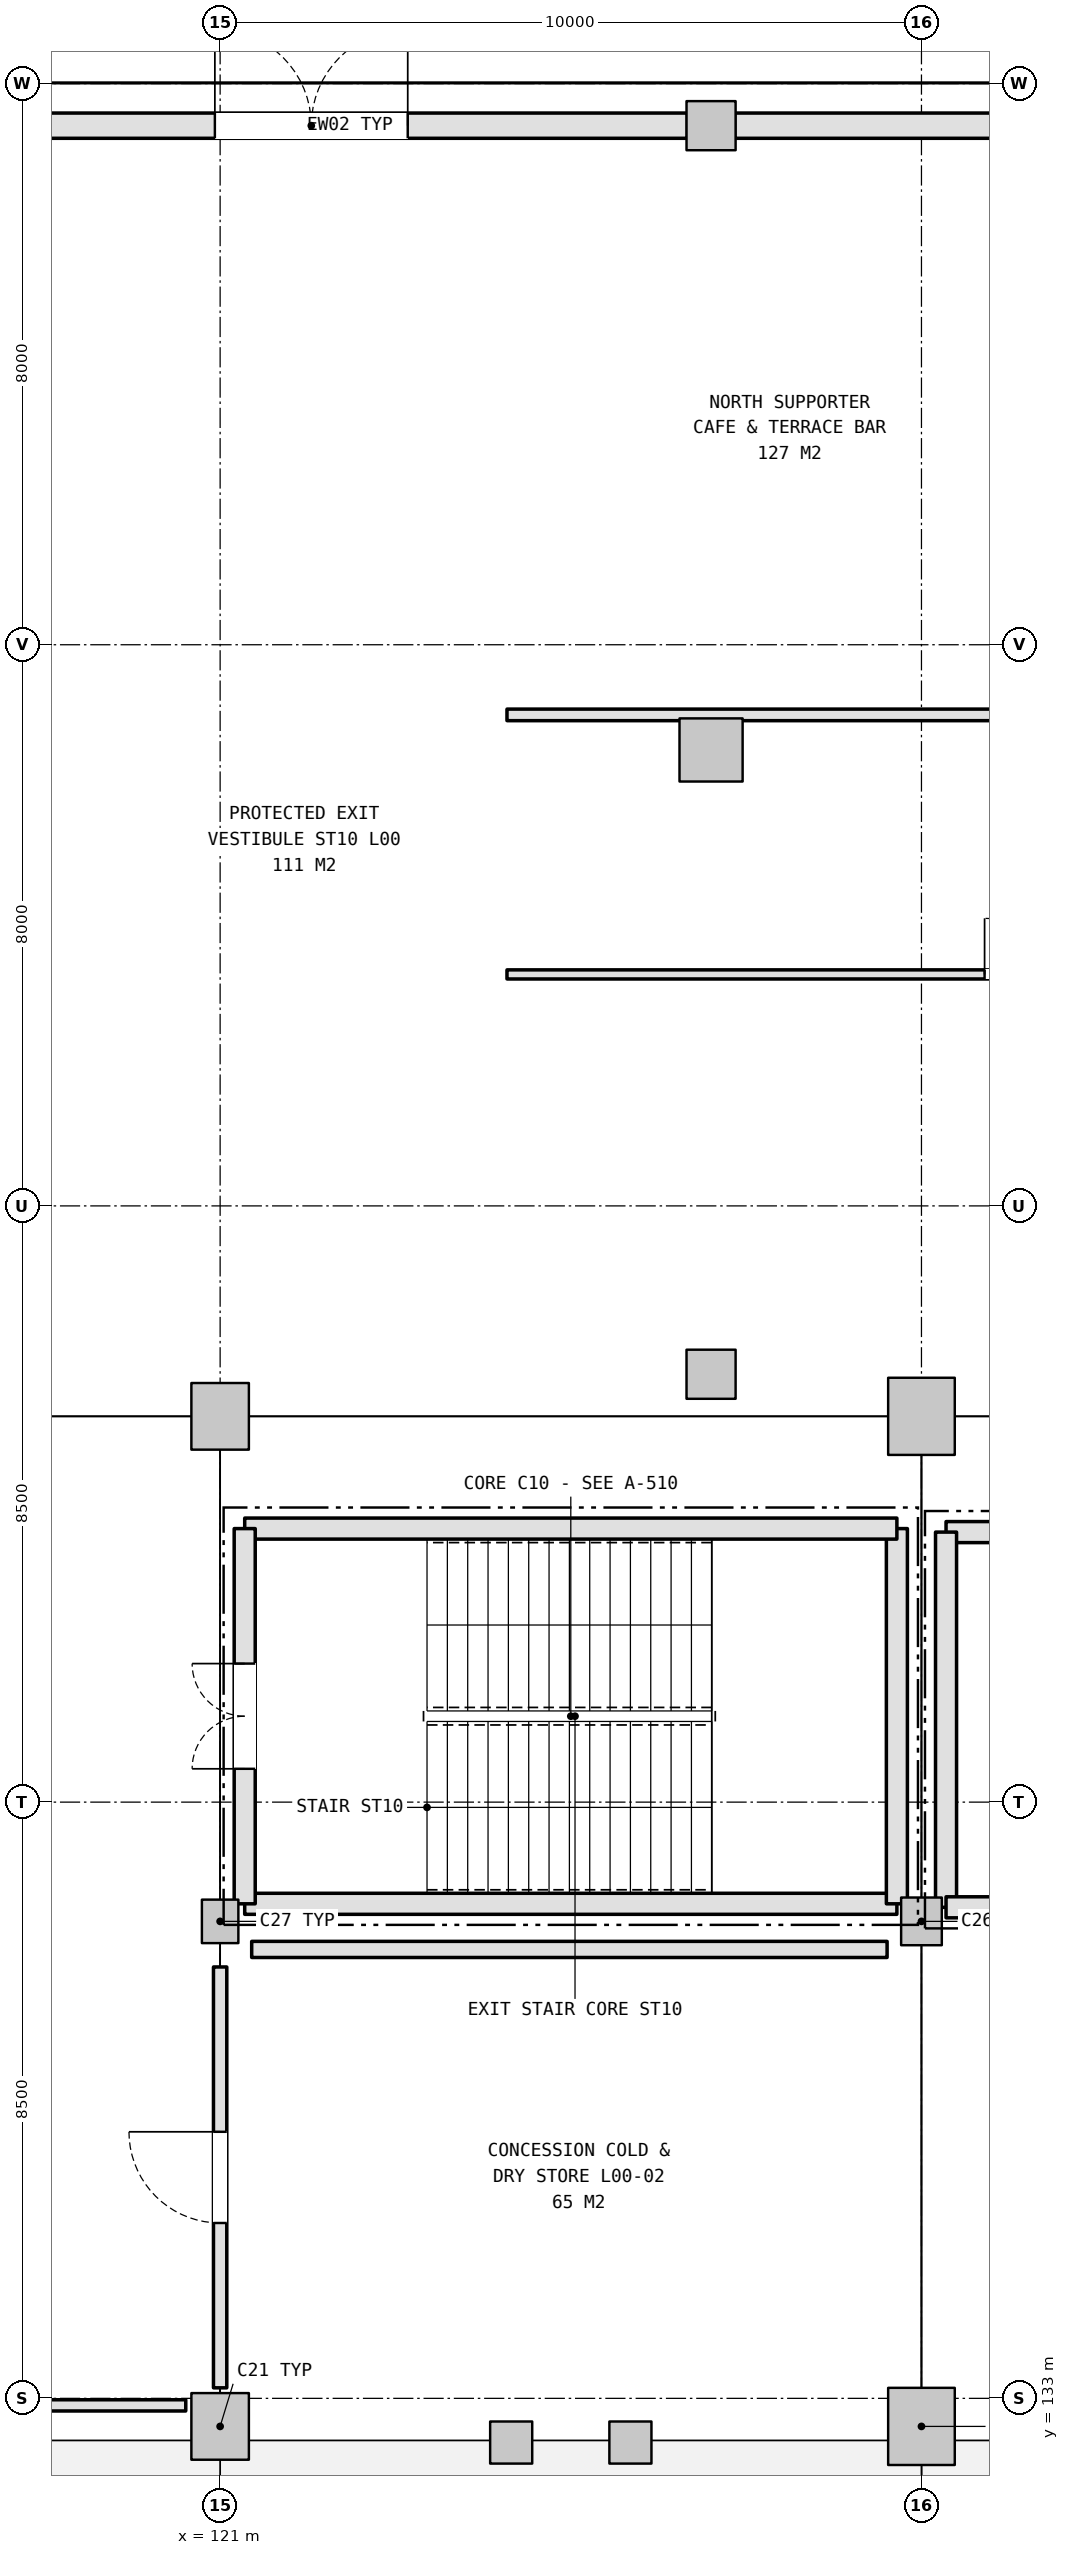
"""IFC4 building model, lengths in metres.
Left out: names, types, materials, properties, quantities, classifications, styles, units other than length and angle.
Written with IfcOpenShell. Run it as: python <this file> out.ifc"""

import sys

from ifc_helpers import new_model, si_unit, direction, frame, frame_2d, origin, origin_2d, place, context, subcontext, project, spatial, rectangle, extrude, element, fill, save


model = new_model("IFC4")
c1 = context("Model", 3, precision=1e-05, world=origin(), true_north=direction((0.0, 1.0)))
c2 = subcontext(c1, "Body", "Model", "MODEL_VIEW")
j1 = project(units=[si_unit("LENGTHUNIT", "METRE"), si_unit("PLANEANGLEUNIT", "RADIAN")], contexts=[c1])
p1 = place(None, origin())
s1 = spatial("IfcSite", under=j1, at=p1, CompositionType="ELEMENT")
p2 = place(p1, origin())
s2 = spatial("IfcBuilding", under=s1, at=p2, CompositionType="ELEMENT")
p3 = place(p2, origin())
s3 = spatial("IfcBuildingStorey", under=s2, at=p3, CompositionType="ELEMENT", Elevation=0.0)
p4 = place(p3, frame((131.0, 132.6, 0.0), z_axis=(0.0, 0.0, 1.0), x_axis=(1.0, 0.0, 0.0)))
e1 = element("IfcColumn", 1, at=p4, inside=s3, PredefinedType="COLUMN", context=c2, shape_type="SweptSolid", body=[
    extrude(rectangle(XDim=0.95, YDim=1.1, at=origin_2d()), origin(), (0.0, 0.0, 1.0), 5.4),
])
p5 = place(p3, frame((131.0, 139.8, 0.0), z_axis=(0.0, 0.0, 1.0), x_axis=(1.0, 0.0, 0.0)))
e2 = element("IfcColumn", 2, at=p5, inside=s3, PredefinedType="COLUMN", context=c2, shape_type="SweptSolid", body=[
    extrude(rectangle(XDim=0.58, YDim=0.68, at=origin_2d()), origin(), (0.0, 0.0, 1.0), 5.4),
])
p6 = place(p3, frame((131.0, 147.0, 0.0), z_axis=(0.0, 0.0, 1.0), x_axis=(1.0, 0.0, 0.0)))
e3 = element("IfcColumn", 3, at=p6, inside=s3, PredefinedType="COLUMN", context=c2, shape_type="SweptSolid", body=[
    extrude(rectangle(XDim=0.95, YDim=1.1, at=origin_2d()), origin(), (0.0, 0.0, 1.0), 5.4),
])
p7 = place(p3, frame((121.0, 132.6, 0.0), z_axis=(0.0, 0.0, 1.0), x_axis=(1.0, 0.0, 0.0)))
e4 = element("IfcColumn", 4, at=p7, inside=s3, PredefinedType="COLUMN", context=c2, shape_type="SweptSolid", body=[
    extrude(rectangle(XDim=0.82, YDim=0.95, at=origin_2d()), origin(), (0.0, 0.0, 1.0), 5.4),
])
p8 = place(p3, frame((121.0, 139.8, 0.0), z_axis=(0.0, 0.0, 1.0), x_axis=(1.0, 0.0, 0.0)))
e5 = element("IfcColumn", 5, at=p8, inside=s3, PredefinedType="COLUMN", context=c2, shape_type="SweptSolid", body=[
    extrude(rectangle(XDim=0.52, YDim=0.62, at=origin_2d()), origin(), (0.0, 0.0, 1.0), 5.4),
])
p9 = place(p3, frame((121.0, 147.0, 0.0), z_axis=(0.0, 0.0, 1.0), x_axis=(1.0, 0.0, 0.0)))
e6 = element("IfcColumn", 6, at=p9, inside=s3, PredefinedType="COLUMN", context=c2, shape_type="SweptSolid", body=[
    extrude(rectangle(XDim=0.82, YDim=0.95, at=origin_2d()), origin(), (0.0, 0.0, 1.0), 5.4),
])
p10 = place(p3, frame((128.0, 147.6, 0.0), z_axis=(0.0, 0.0, 1.0), x_axis=(1.0, 0.0, 0.0)))
e7 = element("IfcColumn", 7, at=p10, inside=s3, PredefinedType="COLUMN", context=c2, shape_type="SweptSolid", body=[
    extrude(rectangle(XDim=0.7, YDim=0.7, at=origin_2d()), origin(), (0.0, 0.0, 1.0), 5.4),
])
p11 = place(p3, frame((128.0, 156.5, 0.0), z_axis=(0.0, 0.0, 1.0), x_axis=(1.0, 0.0, 0.0)))
e8 = element("IfcColumn", 8, at=p11, inside=s3, PredefinedType="COLUMN", context=c2, shape_type="SweptSolid", body=[
    extrude(rectangle(XDim=0.9, YDim=0.9, at=origin_2d()), origin(), (0.0, 0.0, 1.0), 5.4),
])
p12 = place(p3, frame((128.0, 165.4, 0.0), z_axis=(0.0, 0.0, 1.0), x_axis=(1.0, 0.0, 0.0)))
e9 = element("IfcColumn", 9, at=p12, inside=s3, PredefinedType="COLUMN", context=c2, shape_type="SweptSolid", body=[
    extrude(rectangle(XDim=0.7, YDim=0.7, at=origin_2d()), origin(), (0.0, 0.0, 1.0), 5.4),
])
p13 = place(p3, frame((116.938, 165.4, 0.0), z_axis=(0.0, 0.0, 1.0), x_axis=(1.0, 0.0, 0.0)))
e10 = element("IfcWall", 10, at=p13, inside=s3, PredefinedType="SOLIDWALL", context=c2, shape_type="SweptSolid", body=[
    extrude(rectangle(XDim=10.724, YDim=0.36, at=frame_2d((5.362, 0.0))), origin(), (0.0, 0.0, 1.0), 4.475),
])
p14 = place(p13, frame((3.987, 0.0, 0.0)))
e11 = element("IfcOpeningElement", 11, at=p14, cuts=e10, PredefinedType="OPENING", context=c2, shape_type="SweptSolid", body=[
    extrude(rectangle(XDim=2.75, YDim=2.4, at=frame_2d((1.375, 1.2))), frame((0.0, 0.19, 0.0), z_axis=(0.0, -1.0, 0.0), x_axis=(1.0, 0.0, 0.0)), (0.0, 0.0, 1.0), 0.38),
])
p15 = place(p3, frame((128.338, 165.4, 0.0), z_axis=(0.0, 0.0, 1.0), x_axis=(1.0, 0.0, 0.0)))
e12 = element("IfcWall", 12, at=p15, inside=s3, PredefinedType="SOLIDWALL", context=c2, shape_type="SweptSolid", body=[
    extrude(rectangle(XDim=10.724, YDim=0.36, at=frame_2d((5.362, 0.0))), origin(), (0.0, 0.0, 1.0), 4.475),
])
p16 = place(p15, frame((3.987, 0.0, 0.0)))
e13 = element("IfcOpeningElement", 13, at=p16, cuts=e12, PredefinedType="OPENING", context=c2, shape_type="SweptSolid", body=[
    extrude(rectangle(XDim=2.75, YDim=2.4, at=frame_2d((1.375, 1.2))), frame((0.0, 0.19, 0.0), z_axis=(0.0, -1.0, 0.0), x_axis=(1.0, 0.0, 0.0)), (0.0, 0.0, 1.0), 0.38),
])
p17 = place(p3, frame((140.65, 145.35, 0.0), z_axis=(0.0, 0.0, 1.0), x_axis=(-1.0, 0.0, 0.0)))
e14 = element("IfcWall", 14, at=p17, inside=s3, PredefinedType="SHEAR", context=c2, shape_type="SweptSolid", body=[
    extrude(rectangle(XDim=9.299, YDim=0.3, at=frame_2d((4.65, 0.0))), origin(), (0.0, 0.0, 1.0), 5.14),
])
p18 = place(p3, frame((131.35, 145.35, 0.0), z_axis=(0.0, 0.0, 1.0), x_axis=(0.0, -1.0, 0.0)))
e15 = element("IfcWall", 15, at=p18, inside=s3, PredefinedType="SHEAR", context=c2, shape_type="SweptSolid", body=[
    extrude(rectangle(XDim=5.349, YDim=0.3, at=frame_2d((2.675, 0.0))), origin(), (0.0, 0.0, 1.0), 5.14),
])
for number, where, z_axis, x_axis in (
    (16, (131.35, 140.0, 0.0), (0.0, 0.0, 1.0), (1.0, 0.0, 0.0)),
    (17, (121.35, 140.05, 0.0), (0.0, 0.0, 1.0), (1.0, 0.0, 0.0)),
):
    element("IfcWall", number, at=place(p3, frame(where, z_axis=z_axis, x_axis=x_axis)), inside=s3, PredefinedType="SHEAR", context=c2, shape_type="SweptSolid", body=[
        extrude(rectangle(XDim=9.299, YDim=0.3, at=frame_2d((4.65, 0.0))), origin(), (0.0, 0.0, 1.0), 5.14),
    ])
p19 = place(p3, frame((130.65, 140.05, 0.0), z_axis=(0.0, 0.0, 1.0), x_axis=(0.0, 1.0, 0.0)))
e18 = element("IfcWall", 18, at=p19, inside=s3, PredefinedType="SHEAR", context=c2, shape_type="SweptSolid", body=[
    extrude(rectangle(XDim=5.349, YDim=0.3, at=frame_2d((2.675, 0.0))), origin(), (0.0, 0.0, 1.0), 5.14),
])
p20 = place(p3, frame((130.65, 145.4, 0.0), z_axis=(0.0, 0.0, 1.0), x_axis=(-1.0, 0.0, 0.0)))
e19 = element("IfcWall", 19, at=p20, inside=s3, PredefinedType="SHEAR", context=c2, shape_type="SweptSolid", body=[
    extrude(rectangle(XDim=9.299, YDim=0.3, at=frame_2d((4.65, 0.0))), origin(), (0.0, 0.0, 1.0), 5.14),
])
p21 = place(p3, frame((121.35, 145.4, 0.0), z_axis=(0.0, 0.0, 1.0), x_axis=(0.0, -1.0, 0.0)))
e20 = element("IfcWall", 20, at=p21, inside=s3, PredefinedType="SHEAR", context=c2, shape_type="SweptSolid", body=[
    extrude(rectangle(XDim=5.349, YDim=0.3, at=frame_2d((2.675, 0.0))), origin(), (0.0, 0.0, 1.0), 5.14),
])
p22 = place(p21, frame((1.925, 0.0, 0.0)))
e21 = element("IfcOpeningElement", 21, at=p22, cuts=e20, PredefinedType="OPENING", context=c2, shape_type="SweptSolid", body=[
    extrude(rectangle(XDim=1.5, YDim=2.2, at=frame_2d((0.75, 1.1))), frame((0.0, 0.16, 0.0), z_axis=(0.0, -1.0, 0.0), x_axis=(1.0, 0.0, 0.0)), (0.0, 0.0, 1.0), 0.32),
])
for number, where, z_axis, x_axis in (
    (22, (125.15, 132.37, 0.0), (0.0, 0.0, 1.0), (1.0, 0.0, 0.0)),
    (23, (126.85, 132.37, 0.0), (0.0, 0.0, 1.0), (1.0, 0.0, 0.0)),
):
    element("IfcColumn", number, at=place(p3, frame(where, z_axis=z_axis, x_axis=x_axis)), inside=s3, PredefinedType="COLUMN", context=c2, shape_type="SweptSolid", body=[
        extrude(rectangle(XDim=0.6, YDim=0.6, at=origin_2d()), origin(), (0.0, 0.0, 1.0), 5.4),
    ])
p23 = place(p3, frame((125.09, 153.3, 0.0), z_axis=(0.0, 0.0, 1.0), x_axis=(1.0, 0.0, 0.0)))
e24 = element("IfcWall", 24, at=p23, inside=s3, PredefinedType="PARTITIONING", context=c2, shape_type="SweptSolid", body=[
    extrude(rectangle(XDim=15.22, YDim=0.13, at=frame_2d((7.61, 0.0))), origin(), (0.0, 0.0, 1.0), 4.525),
])
p24 = place(p23, frame((6.81, 0.0, 0.0)))
e25 = element("IfcOpeningElement", 25, at=p24, cuts=e24, PredefinedType="OPENING", context=c2, shape_type="SweptSolid", body=[
    extrude(rectangle(XDim=1.6, YDim=2.2, at=frame_2d((0.8, 1.1))), frame((0.0, 0.075, 0.0), z_axis=(0.0, -1.0, 0.0), x_axis=(1.0, 0.0, 0.0)), (0.0, 0.0, 1.0), 0.15),
])
p25 = place(p3, frame((140.31, 157.0, 0.0), z_axis=(0.0, 0.0, 1.0), x_axis=(-1.0, 0.0, 0.0)))
e26 = element("IfcWall", 26, at=p25, inside=s3, PredefinedType="PARTITIONING", context=c2, shape_type="SweptSolid", body=[
    extrude(rectangle(XDim=15.22, YDim=0.165, at=frame_2d((7.61, 0.0))), origin(), (0.0, 0.0, 1.0), 4.525),
])
p26 = place(p25, frame((7.11, 0.0, 0.0)))
e27 = element("IfcOpeningElement", 27, at=p26, cuts=e26, PredefinedType="OPENING", context=c2, shape_type="SweptSolid", body=[
    extrude(rectangle(XDim=1.0, YDim=2.1, at=frame_2d((0.5, 1.05))), frame((0.0, 0.093, 0.0), z_axis=(0.0, -1.0, 0.0), x_axis=(1.0, 0.0, 0.0)), (0.0, 0.0, 1.0), 0.185),
])
p27 = place(p3, frame((121.0, 133.15, 0.0), z_axis=(0.0, 0.0, 1.0), x_axis=(0.0, 1.0, 0.0)))
e28 = element("IfcWall", 28, at=p27, inside=s3, PredefinedType="PARTITIONING", context=c2, shape_type="SweptSolid", body=[
    extrude(rectangle(XDim=6.0, YDim=0.19, at=frame_2d((3.0, 0.0))), origin(), (0.0, 0.0, 1.0), 4.375),
])
p28 = place(p27, frame((2.35, 0.0, 0.0)))
e29 = element("IfcOpeningElement", 29, at=p28, cuts=e28, PredefinedType="OPENING", context=c2, shape_type="SweptSolid", body=[
    extrude(rectangle(XDim=1.3, YDim=2.2, at=frame_2d((0.65, 1.1))), frame((0.0, 0.105, 0.0), z_axis=(0.0, -1.0, 0.0), x_axis=(1.0, 0.0, 0.0)), (0.0, 0.0, 1.0), 0.21),
])
p29 = place(p3, frame((121.45, 139.4, 0.0), z_axis=(0.0, 0.0, 1.0), x_axis=(1.0, 0.0, 0.0)))
e30 = element("IfcWall", 30, at=p29, inside=s3, PredefinedType="PLUMBINGWALL", context=c2, shape_type="SweptSolid", body=[
    extrude(rectangle(XDim=9.06, YDim=0.23, at=frame_2d((4.53, 0.0))), origin(), (0.0, 0.0, 1.0), 5.12),
])
p30 = place(p3, frame((120.51, 132.9, 0.0), z_axis=(0.0, 0.0, 1.0), x_axis=(-1.0, 0.0, 0.0)))
e31 = element("IfcWall", 31, at=p30, inside=s3, PredefinedType="PARTITIONING", context=c2, shape_type="SweptSolid", body=[
    extrude(rectangle(XDim=9.06, YDim=0.16, at=frame_2d((4.53, 0.0))), origin(), (0.0, 0.0, 1.0), 4.325),
])
p31 = place(p14, origin())
e32 = element("IfcDoor", 32, at=p31, inside=s3, OperationType="DOUBLE_DOOR_SINGLE_SWING", PredefinedType="DOOR", context=c2, shape_type="SweptSolid", body=[
    extrude(rectangle(XDim=2.75, YDim=2.4, at=frame_2d((1.375, 1.2))), frame((0.0, 0.025, 0.0), z_axis=(0.0, -1.0, 0.0), x_axis=(1.0, 0.0, 0.0)), (0.0, 0.0, 1.0), 0.05),
])
fill(e11, e32)
p32 = place(p22, frame((1.5, 0.0, 0.0), z_axis=(0.0, 0.0, 1.0), x_axis=(-1.0, 0.0, 0.0)))
e33 = element("IfcDoor", 33, at=p32, inside=s3, OperationType="DOUBLE_DOOR_SINGLE_SWING", PredefinedType="DOOR", context=c2, shape_type="SweptSolid", body=[
    extrude(rectangle(XDim=1.5, YDim=2.2, at=frame_2d((0.75, 1.1))), frame((0.0, 0.025, 0.0), z_axis=(0.0, -1.0, 0.0), x_axis=(1.0, 0.0, 0.0)), (0.0, 0.0, 1.0), 0.05),
])
fill(e21, e33)
p33 = place(p24, origin())
e34 = element("IfcDoor", 34, at=p33, inside=s3, OperationType="DOUBLE_DOOR_SINGLE_SWING", PredefinedType="DOOR", context=c2, shape_type="SweptSolid", body=[
    extrude(rectangle(XDim=1.6, YDim=2.2, at=frame_2d((0.8, 1.1))), frame((0.0, 0.025, 0.0), z_axis=(0.0, -1.0, 0.0), x_axis=(1.0, 0.0, 0.0)), (0.0, 0.0, 1.0), 0.05),
])
fill(e25, e34)
p34 = place(p28, origin())
e35 = element("IfcDoor", 35, at=p34, inside=s3, OperationType="SINGLE_SWING_RIGHT", PredefinedType="DOOR", context=c2, shape_type="SweptSolid", body=[
    extrude(rectangle(XDim=1.3, YDim=2.2, at=frame_2d((0.65, 1.1))), frame((0.0, 0.025, 0.0), z_axis=(0.0, -1.0, 0.0), x_axis=(1.0, 0.0, 0.0)), (0.0, 0.0, 1.0), 0.05),
])
fill(e29, e35)
save(model, sys.argv[1])
